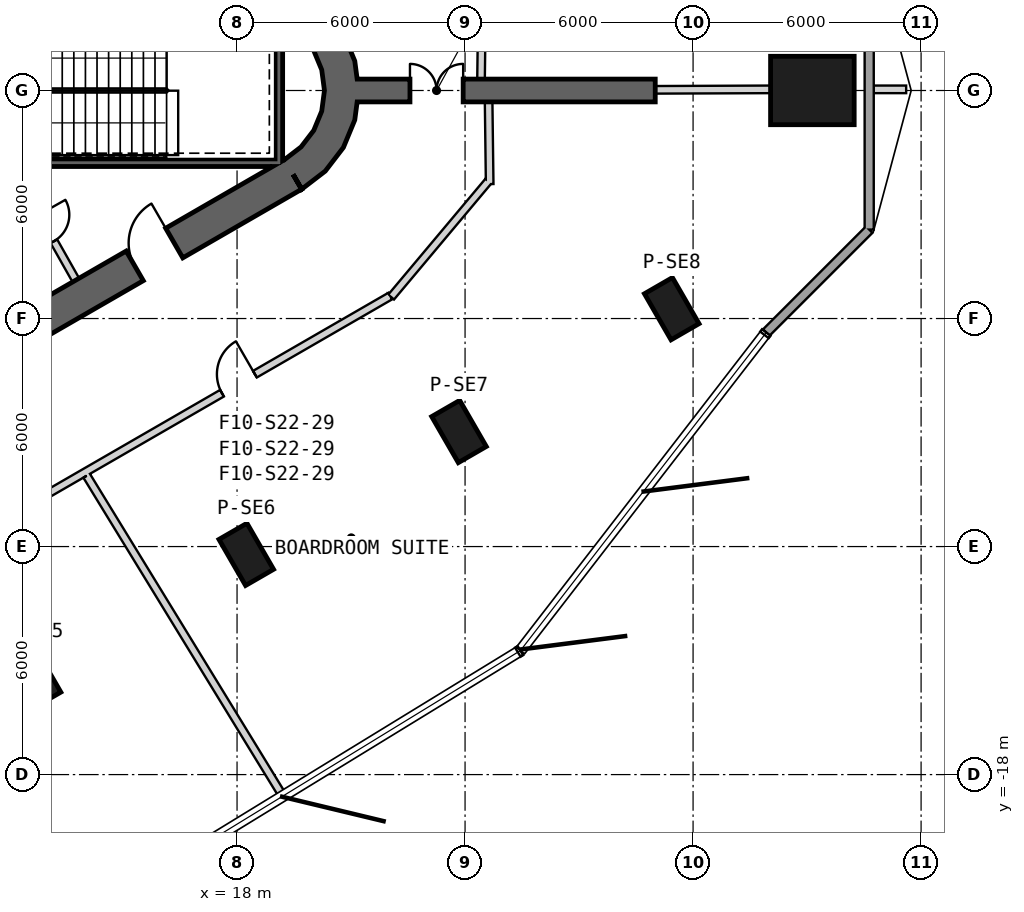
"""IFC4 building model, lengths in metres.
Left out: names, types, materials, properties, quantities, classifications, styles, units other than length and angle.
Written with IfcOpenShell. Run it as: python <this file> out.ifc"""

import sys

from ifc_helpers import new_model, si_unit, direction, frame, frame_2d, origin, origin_2d, place, context, subcontext, project, spatial, polyline, rectangle, outline, extrude, element, fill, save


model = new_model("IFC4")
c1 = context("Model", 3, precision=1e-05, world=origin(), true_north=direction((0.0, 1.0)))
c2 = subcontext(c1, "Body", "Model", "MODEL_VIEW")
j1 = project(units=[si_unit("LENGTHUNIT", "METRE"), si_unit("PLANEANGLEUNIT", "RADIAN")], contexts=[c1])
p1 = place(None, origin())
s1 = spatial("IfcSite", under=j1, at=p1, CompositionType="ELEMENT")
p2 = place(p1, origin())
s2 = spatial("IfcBuilding", under=s1, at=p2, CompositionType="ELEMENT")
p3 = place(p2, frame((0.0, 0.0, 345.5)))
s3 = spatial("IfcBuildingStorey", under=s2, at=p3, CompositionType="ELEMENT", Elevation=345.5)
p4 = place(p3, frame((33.139, 0.0, 0.0), z_axis=(0.0, 0.0, 1.0), x_axis=(1.0, 0.0, 0.0)))
e1 = element("IfcColumn", 1, at=p4, inside=s3, PredefinedType="COLUMN", context=c2, shape_type="SweptSolid", body=[
    extrude(rectangle(XDim=2.2, YDim=1.8, at=origin_2d()), origin(), (0.0, 0.0, 1.0), 3.9),
])
for number, where, z_axis, x_axis in (
    (2, (12.645, -15.438, 0.0), (0.0, 0.0, 1.0), (0.5, -0.866, 0.0)),
    (3, (18.243, -12.206, 0.0), (0.0, 0.0, 1.0), (0.5, -0.866, 0.0)),
    (4, (23.841, -8.974, 0.0), (0.0, 0.0, 1.0), (0.5, -0.866, 0.0)),
    (5, (29.438, -5.742, 0.0), (0.0, 0.0, 1.0), (0.5, -0.866, 0.0)),
):
    element("IfcColumn", number, at=place(p3, frame(where, z_axis=z_axis, x_axis=x_axis)), inside=s3, PredefinedType="COLUMN", context=c2, shape_type="SweptSolid", body=[
        extrude(rectangle(XDim=1.4, YDim=0.85, at=origin_2d()), origin(), (0.0, 0.0, 1.0), 3.9),
    ])
p5 = place(p3, frame((-7.825, -17.97, 0.0), z_axis=(0.0, 0.0, 1.0), x_axis=(0.866028369851, 0.499994862586, 0.0)))
e6 = element("IfcWall", 6, at=p5, inside=s3, PredefinedType="SHEAR", context=c2, shape_type="SweptSolid", body=[
    extrude(rectangle(XDim=31.523, YDim=0.9, at=frame_2d((15.762, 0.0))), origin(), (0.0, 0.0, 1.0), 3.9),
])
p6 = place(p5, frame((17.862, 0.0, 0.0)))
e7 = element("IfcOpeningElement", 7, at=p6, cuts=e6, PredefinedType="OPENING", context=c2, shape_type="SweptSolid", body=[
    extrude(rectangle(XDim=1.2, YDim=2.4, at=frame_2d((0.6, 1.2))), frame((0.0, 0.46, 0.0), z_axis=(0.0, -1.0, 0.0), x_axis=(1.0, 0.0, 0.0)), (0.0, 0.0, 1.0), 0.92),
])
p7 = place(p5, frame((20.562, 0.0, 0.0)))
e8 = element("IfcOpeningElement", 8, at=p7, cuts=e6, PredefinedType="OPENING", context=c2, shape_type="SweptSolid", body=[
    extrude(rectangle(XDim=1.2, YDim=2.4, at=frame_2d((0.6, 1.2))), frame((0.0, 0.46, 0.0), z_axis=(0.0, -1.0, 0.0), x_axis=(1.0, 0.0, 0.0)), (0.0, 0.0, 1.0), 0.92),
])
p8 = place(p5, frame((26.712, 0.0, 0.0)))
e9 = element("IfcOpeningElement", 9, at=p8, cuts=e6, PredefinedType="OPENING", context=c2, shape_type="SweptSolid", body=[
    extrude(rectangle(XDim=1.2, YDim=2.4, at=frame_2d((0.6, 1.2))), frame((0.0, 0.46, 0.0), z_axis=(0.0, -1.0, 0.0), x_axis=(1.0, 0.0, 0.0)), (0.0, 0.0, 1.0), 0.92),
])
p9 = place(p5, frame((3.612, 0.0, 0.0)))
e10 = element("IfcOpeningElement", 10, at=p9, cuts=e6, PredefinedType="OPENING", context=c2, shape_type="SweptSolid", body=[
    extrude(rectangle(XDim=1.2, YDim=2.4, at=frame_2d((0.6, 1.2))), frame((0.0, 0.46, 0.0), z_axis=(0.0, -1.0, 0.0), x_axis=(1.0, 0.0, 0.0)), (0.0, 0.0, 1.0), 0.92),
])
p10 = place(p3, origin())
e11 = element("IfcWall", 11, at=p10, inside=s3, PredefinedType="SHEAR", context=c2, shape_type="SweptSolid", body=[
    extrude(outline(polyline([(19.7, -2.598), (20.321, -2.121), (20.798, -1.5), (21.098, -0.777), (21.2, 0.0), (21.098, 0.777), (20.798, 1.5), (20.321, 2.121), (19.7, 2.598), (19.25, 1.819), (19.685, 1.485), (20.019, 1.05), (20.229, 0.543), (20.3, 0.0), (20.229, -0.543), (20.019, -1.05), (19.685, -1.485), (19.25, -1.819), (19.7, -2.598)])), origin(), (0.0, 0.0, 1.0), 3.9),
])
p11 = place(p3, frame((21.15, 0.0, 0.0), z_axis=(0.0, 0.0, 1.0), x_axis=(1.0, 0.0, 0.0)))
e12 = element("IfcWall", 12, at=p11, inside=s3, PredefinedType="SHEAR", context=c2, shape_type="SweptSolid", body=[
    extrude(rectangle(XDim=7.854, YDim=0.6, at=frame_2d((3.927, 0.0))), origin(), (0.0, 0.0, 1.0), 3.9),
])
p12 = place(p11, frame((1.4, 0.0, 0.0)))
e13 = element("IfcOpeningElement", 13, at=p12, cuts=e12, PredefinedType="OPENING", context=c2, shape_type="SweptSolid", body=[
    extrude(rectangle(XDim=1.4, YDim=2.4, at=frame_2d((0.7, 1.2))), frame((0.0, 0.31, 0.0), z_axis=(0.0, -1.0, 0.0), x_axis=(1.0, 0.0, 0.0)), (0.0, 0.0, 1.0), 0.62),
])
p13 = place(p3, frame((31.927, -6.367, 0.0), z_axis=(0.0, 0.0, 1.0), x_axis=(0.707074898653, 0.707138662283, 0.0)))
e14 = element("IfcWall", 14, at=p13, inside=s3, PredefinedType="SOLIDWALL", context=c2, shape_type="SweptSolid", body=[
    extrude(rectangle(XDim=3.829, YDim=0.24, at=frame_2d((1.915, 0.0))), origin(), (0.0, 0.0, 1.0), 3.6),
])
p14 = place(p3, frame((34.634, -3.66, 0.0), z_axis=(0.0, 0.0, 1.0), x_axis=(0.0, 1.0, 0.0)))
e15 = element("IfcWall", 15, at=p14, inside=s3, PredefinedType="SOLIDWALL", context=c2, shape_type="SweptSolid", body=[
    extrude(rectangle(XDim=7.32, YDim=0.24, at=frame_2d((3.66, 0.0))), origin(), (0.0, 0.0, 1.0), 3.6),
])
p15 = place(p3, frame((19.1, -2.0, -0.3), z_axis=(0.0, 0.0, 1.0), x_axis=(0.0, 1.0, 0.0)))
e16 = element("IfcWall", 16, at=p15, inside=s3, PredefinedType="SHEAR", context=c2, shape_type="SweptSolid", body=[
    extrude(rectangle(XDim=3.8, YDim=0.2, at=frame_2d((1.9, 0.0))), origin(), (0.0, 0.0, 1.0), 3.9),
])
p16 = place(p3, frame((11.1, -1.9, -0.3), z_axis=(0.0, 0.0, 1.0), x_axis=(1.0, 0.0, 0.0)))
e17 = element("IfcWall", 17, at=p16, inside=s3, PredefinedType="SHEAR", context=c2, shape_type="SweptSolid", body=[
    extrude(rectangle(XDim=7.9, YDim=0.2, at=frame_2d((3.95, 0.0))), origin(), (0.0, 0.0, 1.0), 3.9),
])
p17 = place(p3, frame((13.758, -4.99, 0.0), z_axis=(0.0, 0.0, 1.0), x_axis=(-0.491993409184, 0.87059892334, 0.0)))
e18 = element("IfcWall", 18, at=p17, inside=s3, PredefinedType="PARTITIONING", context=c2, shape_type="SweptSolid", body=[
    extrude(rectangle(XDim=3.15, YDim=0.2, at=frame_2d((1.575, 0.0))), origin(), (0.0, 0.0, 1.0), 3.6),
])
p18 = place(p17, frame((1.175, 0.0, 0.0)))
e19 = element("IfcOpeningElement", 19, at=p18, cuts=e18, PredefinedType="OPENING", context=c2, shape_type="SweptSolid", body=[
    extrude(rectangle(XDim=0.8, YDim=2.1, at=frame_2d((0.4, 1.05))), frame((0.0, 0.11, 0.0), z_axis=(0.0, -1.0, 0.0), x_axis=(1.0, 0.0, 0.0)), (0.0, 0.0, 1.0), 0.22),
])
p19 = place(p3, frame((24.42, 0.3, 0.0), z_axis=(0.0, 0.0, 1.0), x_axis=(0.013193472226, 0.999912962358, 0.0)))
e20 = element("IfcWall", 20, at=p19, inside=s3, PredefinedType="PARTITIONING", context=c2, shape_type="SweptSolid", body=[
    extrude(rectangle(XDim=1.925, YDim=0.2, at=frame_2d((0.962, 0.0))), origin(), (0.0, 0.0, 1.0), 3.6),
])
p20 = place(p3, frame((24.648, -2.462, 0.0), z_axis=(0.0, 0.0, 1.0), x_axis=(-0.012757232068, 0.999918623204, 0.0)))
e21 = element("IfcWall", 21, at=p20, inside=s3, PredefinedType="PARTITIONING", context=c2, shape_type="SweptSolid", body=[
    extrude(rectangle(XDim=2.163, YDim=0.2, at=frame_2d((1.081, 0.0))), origin(), (0.0, 0.0, 1.0), 3.6),
])
p21 = place(p3, frame((22.054, -5.435, 0.0), z_axis=(0.0, 0.0, 1.0), x_axis=(0.642790979996, 0.766041615081, 0.0)))
e22 = element("IfcWall", 22, at=p21, inside=s3, PredefinedType="PARTITIONING", context=c2, shape_type="SweptSolid", body=[
    extrude(rectangle(XDim=3.983, YDim=0.2, at=frame_2d((1.992, 0.0))), origin(), (0.0, 0.0, 1.0), 2.88),
])
p22 = place(p3, frame((-6.505, -21.885, 0.0), z_axis=(0.0, 0.0, 1.0), x_axis=(0.86602457258, 0.500001439686, 0.0)))
e23 = element("IfcWall", 23, at=p22, inside=s3, PredefinedType="PARTITIONING", context=c2, shape_type="SweptSolid", body=[
    extrude(rectangle(XDim=32.952, YDim=0.2, at=frame_2d((16.476, 0.0))), origin(), (0.0, 0.0, 1.0), 2.97),
])
p23 = place(p22, frame((27.839, 0.0, 0.0)))
e24 = element("IfcOpeningElement", 24, at=p23, cuts=e23, PredefinedType="OPENING", context=c2, shape_type="SweptSolid", body=[
    extrude(rectangle(XDim=1.0, YDim=2.1, at=frame_2d((0.5, 1.05))), frame((0.0, 0.11, 0.0), z_axis=(0.0, -1.0, 0.0), x_axis=(1.0, 0.0, 0.0)), (0.0, 0.0, 1.0), 0.22),
])
p24 = place(p22, frame((15.873, 0.0, 0.0)))
e25 = element("IfcOpeningElement", 25, at=p24, cuts=e23, PredefinedType="OPENING", context=c2, shape_type="SweptSolid", body=[
    extrude(rectangle(XDim=1.0, YDim=2.1, at=frame_2d((0.5, 1.05))), frame((0.0, 0.11, 0.0), z_axis=(0.0, -1.0, 0.0), x_axis=(1.0, 0.0, 0.0)), (0.0, 0.0, 1.0), 0.22),
])
p25 = place(p22, frame((4.06, 0.0, 0.0)))
e26 = element("IfcOpeningElement", 26, at=p25, cuts=e23, PredefinedType="OPENING", context=c2, shape_type="SweptSolid", body=[
    extrude(rectangle(XDim=1.0, YDim=2.1, at=frame_2d((0.5, 1.05))), frame((0.0, 0.11, 0.0), z_axis=(0.0, -1.0, 0.0), x_axis=(1.0, 0.0, 0.0)), (0.0, 0.0, 1.0), 0.22),
])
p26 = place(p3, frame((29.004, 0.018, 0.0), z_axis=(0.0, 0.0, 1.0), x_axis=(0.999991911041, 0.004022170023, 0.0)))
e27 = element("IfcWall", 27, at=p26, inside=s3, PredefinedType="PARTITIONING", context=c2, shape_type="SweptSolid", body=[
    extrude(rectangle(XDim=3.035, YDim=0.2, at=frame_2d((1.518, 0.0))), origin(), (0.0, 0.0, 1.0), 3.17),
])
p27 = place(p3, frame((34.754, 0.03, 0.0), z_axis=(0.0, 0.0, 1.0), x_axis=(1.0, 0.0, 0.0)))
e28 = element("IfcWall", 28, at=p27, inside=s3, PredefinedType="PARTITIONING", context=c2, shape_type="SweptSolid", body=[
    extrude(rectangle(XDim=0.853, YDim=0.2, at=frame_2d((0.426, 0.0))), origin(), (0.0, 0.0, 1.0), 3.6),
])
p28 = place(p3, frame((14.042, -10.137, 0.0), z_axis=(0.0, 0.0, 1.0), x_axis=(0.522290974672, -0.852767340941, 0.0)))
e29 = element("IfcWall", 29, at=p28, inside=s3, PredefinedType="PARTITIONING", context=c2, shape_type="SweptSolid", body=[
    extrude(rectangle(XDim=9.885, YDim=0.2, at=frame_2d((4.942, 0.0))), origin(), (0.0, 0.0, 1.0), 3.6),
])
p29 = place(p18, origin())
e30 = element("IfcDoor", 30, at=p29, inside=s3, OperationType="SINGLE_SWING_RIGHT", PredefinedType="USERDEFINED", context=c2, shape_type="SweptSolid", body=[
    extrude(rectangle(XDim=0.8, YDim=2.1, at=frame_2d((0.4, 1.05))), frame((0.0, 0.025, 0.0), z_axis=(0.0, -1.0, 0.0), x_axis=(1.0, 0.0, 0.0)), (0.0, 0.0, 1.0), 0.05),
])
fill(e19, e30)
p30 = place(p23, origin())
e31 = element("IfcDoor", 31, at=p30, inside=s3, OperationType="SINGLE_SWING_RIGHT", PredefinedType="USERDEFINED", context=c2, shape_type="SweptSolid", body=[
    extrude(rectangle(XDim=1.0, YDim=2.1, at=frame_2d((0.5, 1.05))), frame((0.0, 0.025, 0.0), z_axis=(0.0, -1.0, 0.0), x_axis=(1.0, 0.0, 0.0)), (0.0, 0.0, 1.0), 0.05),
])
fill(e24, e31)
p31 = place(p8, origin())
e32 = element("IfcDoor", 32, at=p31, inside=s3, OperationType="SINGLE_SWING_RIGHT", PredefinedType="USERDEFINED", context=c2, shape_type="SweptSolid", body=[
    extrude(rectangle(XDim=1.2, YDim=2.4, at=frame_2d((0.6, 1.2))), frame((0.0, 0.025, 0.0), z_axis=(0.0, -1.0, 0.0), x_axis=(1.0, 0.0, 0.0)), (0.0, 0.0, 1.0), 0.05),
])
fill(e9, e32)
p32 = place(p12, origin())
e33 = element("IfcDoor", 33, at=p32, inside=s3, OperationType="DOUBLE_DOOR_SINGLE_SWING", PredefinedType="NOTDEFINED", context=c2, shape_type="SweptSolid", body=[
    extrude(rectangle(XDim=1.4, YDim=2.4, at=frame_2d((0.7, 1.2))), frame((0.0, 0.025, 0.0), z_axis=(0.0, -1.0, 0.0), x_axis=(1.0, 0.0, 0.0)), (0.0, 0.0, 1.0), 0.05),
])
fill(e13, e33)
save(model, sys.argv[1])
